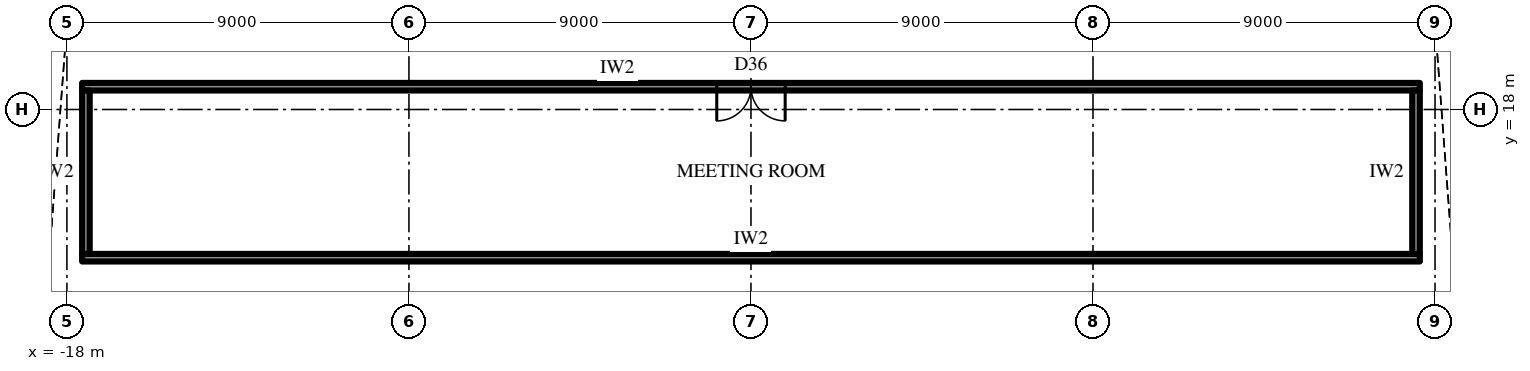
"""IFC4 building model, lengths in metres.
Left out: names, types, materials, properties, quantities, classifications, styles, units other than length and angle.
Written with IfcOpenShell. Run it as: python <this file> out.ifc"""

import sys

from ifc_helpers import new_model, si_unit, direction, frame, frame_2d, origin, place, context, subcontext, project, spatial, rectangle, extrude, element, fill, save


model = new_model("IFC4")
c1 = context("Model", 3, precision=1e-05, world=origin(), true_north=direction((0.0, 1.0)))
c2 = subcontext(c1, "Body", "Model", "MODEL_VIEW")
j1 = project(units=[si_unit("LENGTHUNIT", "METRE"), si_unit("PLANEANGLEUNIT", "RADIAN")], contexts=[c1])
p1 = place(None, origin())
s1 = spatial("IfcSite", under=j1, at=p1, CompositionType="ELEMENT")
p2 = place(p1, origin())
s2 = spatial("IfcBuilding", under=s1, at=p2, CompositionType="ELEMENT")
p3 = place(p2, frame((0.0, 0.0, 182.5)))
s3 = spatial("IfcBuildingStorey", under=s2, at=p3, CompositionType="ELEMENT", Elevation=182.5)
p4 = place(p3, frame((-17.6, 14.1, 0.0), z_axis=(0.0, 0.0, 1.0), x_axis=(1.0, 0.0, 0.0)))
e1 = element("IfcWall", 1, at=p4, inside=s3, PredefinedType="PARTITIONING", context=c2, shape_type="SweptSolid", body=[
    extrude(rectangle(XDim=35.2, YDim=0.2, at=frame_2d((17.6, 0.0))), origin(), (0.0, 0.0, 1.0), 4.0),
])
p5 = place(p3, frame((-17.6, 18.6, 0.0), z_axis=(0.0, 0.0, 1.0), x_axis=(1.0, 0.0, 0.0)))
e2 = element("IfcWall", 2, at=p5, inside=s3, PredefinedType="PARTITIONING", context=c2, shape_type="SweptSolid", body=[
    extrude(rectangle(XDim=35.2, YDim=0.2, at=frame_2d((17.6, 0.0))), origin(), (0.0, 0.0, 1.0), 4.0),
])
p6 = place(p5, frame((16.7, 0.0, 0.0)))
e3 = element("IfcOpeningElement", 3, at=p6, cuts=e2, PredefinedType="OPENING", context=c2, shape_type="SweptSolid", body=[
    extrude(rectangle(XDim=1.8, YDim=2.4, at=frame_2d((0.9, 1.2))), frame((0.0, 0.11, 0.0), z_axis=(0.0, -1.0, 0.0), x_axis=(1.0, 0.0, 0.0)), (0.0, 0.0, 1.0), 0.22),
])
for number, where, z_axis, x_axis in (
    (4, (-17.5, 14.2, 0.0), (0.0, 0.0, 1.0), (0.0, 1.0, 0.0)),
    (5, (17.5, 14.2, 0.0), (0.0, 0.0, 1.0), (0.0, 1.0, 0.0)),
):
    element("IfcWall", number, at=place(p3, frame(where, z_axis=z_axis, x_axis=x_axis)), inside=s3, PredefinedType="PARTITIONING", context=c2, shape_type="SweptSolid", body=[
        extrude(rectangle(XDim=4.3, YDim=0.2, at=frame_2d((2.15, 0.0))), origin(), (0.0, 0.0, 1.0), 4.0),
    ])
p7 = place(p6, frame((1.8, 0.0, 0.0), z_axis=(0.0, 0.0, 1.0), x_axis=(-1.0, 0.0, 0.0)))
e6 = element("IfcDoor", 6, at=p7, inside=s3, OperationType="DOUBLE_DOOR_SINGLE_SWING", PredefinedType="DOOR", context=c2, shape_type="SweptSolid", body=[
    extrude(rectangle(XDim=1.8, YDim=2.4, at=frame_2d((0.9, 1.2))), frame((0.0, 0.025, 0.0), z_axis=(0.0, -1.0, 0.0), x_axis=(1.0, 0.0, 0.0)), (0.0, 0.0, 1.0), 0.05),
])
fill(e3, e6)
save(model, sys.argv[1])
